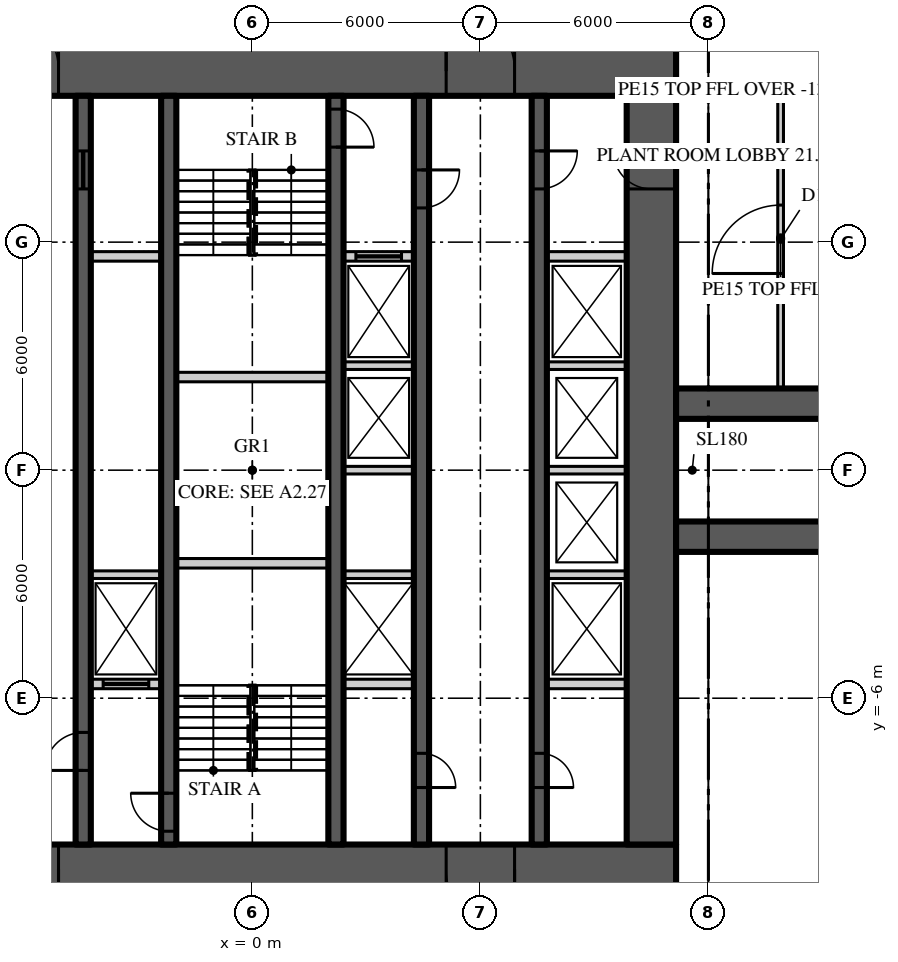
"""IFC4 building model, lengths in metres.
Left out: names, types, materials, properties, quantities, classifications, styles, units other than length and angle.
Written with IfcOpenShell. Run it as: python <this file> out.ifc"""

import sys

from ifc_helpers import new_model, si_unit, direction, frame, frame_2d, origin, place, context, subcontext, project, spatial, rectangle, extrude, element, fill, save


model = new_model("IFC4")
c1 = context("Model", 3, precision=1e-05, world=origin(), true_north=direction((0.0, 1.0)))
c2 = subcontext(c1, "Body", "Model", "MODEL_VIEW")
j1 = project(units=[si_unit("LENGTHUNIT", "METRE"), si_unit("PLANEANGLEUNIT", "RADIAN")], contexts=[c1])
p1 = place(None, origin())
s1 = spatial("IfcSite", under=j1, at=p1, CompositionType="ELEMENT")
p2 = place(p1, origin())
s2 = spatial("IfcBuilding", under=s1, at=p2, CompositionType="ELEMENT")
p3 = place(p2, frame((0.0, 0.0, 198.9)))
s3 = spatial("IfcBuildingStorey", under=s2, at=p3, CompositionType="ELEMENT", Elevation=198.9)
p4 = place(p3, frame((-11.15, 10.5, 0.0), z_axis=(0.0, 0.0, 1.0), x_axis=(1.0, 0.0, 0.0)))
e1 = element("IfcWall", 1, at=p4, inside=s3, PredefinedType="SHEAR", context=c2, shape_type="SweptSolid", body=[
    extrude(rectangle(XDim=22.3, YDim=1.3, at=frame_2d((11.15, 0.0))), origin(), (0.0, 0.0, 1.0), 6.0),
])
p5 = place(p4, frame((4.25, 0.0, 0.0)))
e2 = element("IfcOpeningElement", 2, at=p5, cuts=e1, PredefinedType="OPENING", context=c2, shape_type="SweptSolid", body=[
    extrude(rectangle(XDim=1.8, YDim=2.2, at=frame_2d((0.9, 1.1))), frame((0.0, 0.66, 0.0), z_axis=(0.0, -1.0, 0.0), x_axis=(1.0, 0.0, 0.0)), (0.0, 0.0, 1.0), 1.32),
])
p6 = place(p4, frame((16.25, 0.0, 0.0)))
e3 = element("IfcOpeningElement", 3, at=p6, cuts=e1, PredefinedType="OPENING", context=c2, shape_type="SweptSolid", body=[
    extrude(rectangle(XDim=1.8, YDim=2.2, at=frame_2d((0.9, 1.1))), frame((0.0, 0.66, 0.0), z_axis=(0.0, -1.0, 0.0), x_axis=(1.0, 0.0, 0.0)), (0.0, 0.0, 1.0), 1.32),
])
p7 = place(p3, frame((11.15, -10.5, 0.0), z_axis=(0.0, 0.0, 1.0), x_axis=(-1.0, 0.0, 0.0)))
e4 = element("IfcWall", 4, at=p7, inside=s3, PredefinedType="SHEAR", context=c2, shape_type="SweptSolid", body=[
    extrude(rectangle(XDim=22.3, YDim=1.3, at=frame_2d((11.15, 0.0))), origin(), (0.0, 0.0, 1.0), 6.0),
])
p8 = place(p7, frame((16.25, 0.0, 0.0)))
e5 = element("IfcOpeningElement", 5, at=p8, cuts=e4, PredefinedType="OPENING", context=c2, shape_type="SweptSolid", body=[
    extrude(rectangle(XDim=1.8, YDim=2.2, at=frame_2d((0.9, 1.1))), frame((0.0, 0.66, 0.0), z_axis=(0.0, -1.0, 0.0), x_axis=(1.0, 0.0, 0.0)), (0.0, 0.0, 1.0), 1.32),
])
p9 = place(p7, frame((4.25, 0.0, 0.0)))
e6 = element("IfcOpeningElement", 6, at=p9, cuts=e4, PredefinedType="OPENING", context=c2, shape_type="SweptSolid", body=[
    extrude(rectangle(XDim=1.8, YDim=2.2, at=frame_2d((0.9, 1.1))), frame((0.0, 0.66, 0.0), z_axis=(0.0, -1.0, 0.0), x_axis=(1.0, 0.0, 0.0)), (0.0, 0.0, 1.0), 1.32),
])
p10 = place(p3, frame((10.5, -9.85, 0.0), z_axis=(0.0, 0.0, 1.0), x_axis=(0.0, 1.0, 0.0)))
e7 = element("IfcWall", 7, at=p10, inside=s3, PredefinedType="SHEAR", context=c2, shape_type="SweptSolid", body=[
    extrude(rectangle(XDim=19.7, YDim=1.3, at=frame_2d((9.85, 0.0))), origin(), (0.0, 0.0, 1.0), 6.0),
])
p11 = place(p10, frame((17.25, 0.0, 0.0)))
e8 = element("IfcOpeningElement", 8, at=p11, cuts=e7, PredefinedType="OPENING", context=c2, shape_type="SweptSolid", body=[
    extrude(rectangle(XDim=1.0, YDim=2.2, at=frame_2d((0.5, 1.1))), frame((0.0, 0.66, 0.0), z_axis=(0.0, -1.0, 0.0), x_axis=(1.0, 0.0, 0.0)), (0.0, 0.0, 1.0), 1.32),
])
for number, where, z_axis, x_axis in (
    (9, (11.15, -1.75, 0.0), (0.0, 0.0, 1.0), (1.0, 0.0, 0.0)),
    (10, (11.15, 1.75, 0.0), (0.0, 0.0, 1.0), (1.0, 0.0, 0.0)),
):
    element("IfcWall", number, at=place(p3, frame(where, z_axis=z_axis, x_axis=x_axis)), inside=s3, PredefinedType="SHEAR", context=c2, shape_type="SweptSolid", body=[
        extrude(rectangle(XDim=15.25, YDim=0.8, at=frame_2d((7.625, 0.0))), origin(), (0.0, 0.0, 1.0), 6.0),
    ])
p12 = place(p3, frame((7.55, 9.85, 0.0), z_axis=(0.0, 0.0, 1.0), x_axis=(0.0, -1.0, 0.0)))
e11 = element("IfcWall", 11, at=p12, inside=s3, PredefinedType="SHEAR", context=c2, shape_type="SweptSolid", body=[
    extrude(rectangle(XDim=19.7, YDim=0.4, at=frame_2d((9.85, 0.0))), origin(), (0.0, 0.0, 1.0), 6.0),
])
p13 = place(p12, frame((1.45, 0.0, 0.0)))
e12 = element("IfcOpeningElement", 12, at=p13, cuts=e11, PredefinedType="OPENING", context=c2, shape_type="SweptSolid", body=[
    extrude(rectangle(XDim=1.0, YDim=2.2, at=frame_2d((0.5, 1.1))), frame((0.0, 0.21, 0.0), z_axis=(0.0, -1.0, 0.0), x_axis=(1.0, 0.0, 0.0)), (0.0, 0.0, 1.0), 0.42),
])
p14 = place(p12, frame((17.3, 0.0, 0.0)))
e13 = element("IfcOpeningElement", 13, at=p14, cuts=e11, PredefinedType="OPENING", context=c2, shape_type="SweptSolid", body=[
    extrude(rectangle(XDim=0.9, YDim=2.1, at=frame_2d((0.45, 1.05))), frame((0.0, 0.21, 0.0), z_axis=(0.0, -1.0, 0.0), x_axis=(1.0, 0.0, 0.0)), (0.0, 0.0, 1.0), 0.42),
])
p15 = place(p3, frame((-4.45, -9.85, 0.0), z_axis=(0.0, 0.0, 1.0), x_axis=(0.0, 1.0, 0.0)))
e14 = element("IfcWall", 14, at=p15, inside=s3, PredefinedType="SHEAR", context=c2, shape_type="SweptSolid", body=[
    extrude(rectangle(XDim=19.7, YDim=0.4, at=frame_2d((9.85, 0.0))), origin(), (0.0, 0.0, 1.0), 6.0),
])
p16 = place(p15, frame((1.95, 0.0, 0.0)))
e15 = element("IfcOpeningElement", 15, at=p16, cuts=e14, PredefinedType="OPENING", context=c2, shape_type="SweptSolid", body=[
    extrude(rectangle(XDim=1.0, YDim=2.2, at=frame_2d((0.5, 1.1))), frame((0.0, 0.21, 0.0), z_axis=(0.0, -1.0, 0.0), x_axis=(1.0, 0.0, 0.0)), (0.0, 0.0, 1.0), 0.42),
])
p17 = place(p15, frame((17.25, 0.0, 0.0)))
e16 = element("IfcOpeningElement", 16, at=p17, cuts=e14, PredefinedType="OPENING", context=c2, shape_type="SweptSolid", body=[
    extrude(rectangle(XDim=1.0, YDim=2.1, at=frame_2d((0.5, 1.05))), frame((0.0, 0.21, 0.0), z_axis=(0.0, -1.0, 0.0), x_axis=(1.0, 0.0, 0.0)), (0.0, 0.0, 1.0), 0.42),
])
p18 = place(p3, frame((4.45, 9.85, 0.0), z_axis=(0.0, 0.0, 1.0), x_axis=(0.0, -1.0, 0.0)))
e17 = element("IfcWall", 17, at=p18, inside=s3, PredefinedType="SHEAR", context=c2, shape_type="SweptSolid", body=[
    extrude(rectangle(XDim=19.7, YDim=0.4, at=frame_2d((9.85, 0.0))), origin(), (0.0, 0.0, 1.0), 6.0),
])
p19 = place(p18, frame((1.95, 0.0, 0.0)))
e18 = element("IfcOpeningElement", 18, at=p19, cuts=e17, PredefinedType="OPENING", context=c2, shape_type="SweptSolid", body=[
    extrude(rectangle(XDim=1.0, YDim=2.2, at=frame_2d((0.5, 1.1))), frame((0.0, 0.21, 0.0), z_axis=(0.0, -1.0, 0.0), x_axis=(1.0, 0.0, 0.0)), (0.0, 0.0, 1.0), 0.42),
])
p20 = place(p18, frame((17.3, 0.0, 0.0)))
e19 = element("IfcOpeningElement", 19, at=p20, cuts=e17, PredefinedType="OPENING", context=c2, shape_type="SweptSolid", body=[
    extrude(rectangle(XDim=0.9, YDim=2.1, at=frame_2d((0.45, 1.05))), frame((0.0, 0.21, 0.0), z_axis=(0.0, -1.0, 0.0), x_axis=(1.0, 0.0, 0.0)), (0.0, 0.0, 1.0), 0.42),
])
p21 = place(p3, frame((-2.2, -9.85, 0.0), z_axis=(0.0, 0.0, 1.0), x_axis=(0.0, 1.0, 0.0)))
e20 = element("IfcWall", 20, at=p21, inside=s3, PredefinedType="SHEAR", context=c2, shape_type="SweptSolid", body=[
    extrude(rectangle(XDim=19.7, YDim=0.4, at=frame_2d((9.85, 0.0))), origin(), (0.0, 0.0, 1.0), 6.0),
])
p22 = place(p21, frame((0.35, 0.0, 0.0)))
e21 = element("IfcOpeningElement", 21, at=p22, cuts=e20, PredefinedType="OPENING", context=c2, shape_type="SweptSolid", body=[
    extrude(rectangle(XDim=1.0, YDim=2.2, at=frame_2d((0.5, 1.1))), frame((0.0, 0.21, 0.0), z_axis=(0.0, -1.0, 0.0), x_axis=(1.0, 0.0, 0.0)), (0.0, 0.0, 1.0), 0.42),
])
p23 = place(p3, frame((2.2, 9.85, 0.0), z_axis=(0.0, 0.0, 1.0), x_axis=(0.0, -1.0, 0.0)))
e22 = element("IfcWall", 22, at=p23, inside=s3, PredefinedType="SHEAR", context=c2, shape_type="SweptSolid", body=[
    extrude(rectangle(XDim=19.7, YDim=0.4, at=frame_2d((9.85, 0.0))), origin(), (0.0, 0.0, 1.0), 6.0),
])
p24 = place(p23, frame((0.35, 0.0, 0.0)))
e23 = element("IfcOpeningElement", 23, at=p24, cuts=e22, PredefinedType="OPENING", context=c2, shape_type="SweptSolid", body=[
    extrude(rectangle(XDim=1.0, YDim=2.2, at=frame_2d((0.5, 1.1))), frame((0.0, 0.21, 0.0), z_axis=(0.0, -1.0, 0.0), x_axis=(1.0, 0.0, 0.0)), (0.0, 0.0, 1.0), 0.42),
])
p25 = place(p3, frame((-4.25, 5.625, 0.0), z_axis=(0.0, 0.0, 1.0), x_axis=(1.0, 0.0, 0.0)))
e24 = element("IfcWall", 24, at=p25, inside=s3, PredefinedType="SOLIDWALL", context=c2, shape_type="SweptSolid", body=[
    extrude(rectangle(XDim=1.85, YDim=0.25, at=frame_2d((0.925, 0.0))), origin(), (0.0, 0.0, 1.0), 5.8),
])
p26 = place(p3, frame((2.4, 5.625, 0.0), z_axis=(0.0, 0.0, 1.0), x_axis=(1.0, 0.0, 0.0)))
e25 = element("IfcWall", 25, at=p26, inside=s3, PredefinedType="SOLIDWALL", context=c2, shape_type="SweptSolid", body=[
    extrude(rectangle(XDim=1.85, YDim=0.25, at=frame_2d((0.925, 0.0))), origin(), (0.0, 0.0, 1.0), 5.8),
])
p27 = place(p26, frame((0.325, 0.0, 0.0)))
e26 = element("IfcOpeningElement", 26, at=p27, cuts=e25, PredefinedType="OPENING", context=c2, shape_type="SweptSolid", body=[
    extrude(rectangle(XDim=1.2, YDim=2.2, at=frame_2d((0.6, 1.1))), frame((0.0, 0.135, 0.0), z_axis=(0.0, -1.0, 0.0), x_axis=(1.0, 0.0, 0.0)), (0.0, 0.0, 1.0), 0.27),
])
p28 = place(p3, frame((7.75, 5.625, 0.0), z_axis=(0.0, 0.0, 1.0), x_axis=(1.0, 0.0, 0.0)))
e27 = element("IfcWall", 27, at=p28, inside=s3, PredefinedType="SOLIDWALL", context=c2, shape_type="SweptSolid", body=[
    extrude(rectangle(XDim=2.1, YDim=0.25, at=frame_2d((1.05, 0.0))), origin(), (0.0, 0.0, 1.0), 5.8),
])
p29 = place(p3, frame((-4.25, -5.625, 0.0), z_axis=(0.0, 0.0, 1.0), x_axis=(1.0, 0.0, 0.0)))
e28 = element("IfcWall", 28, at=p29, inside=s3, PredefinedType="SOLIDWALL", context=c2, shape_type="SweptSolid", body=[
    extrude(rectangle(XDim=1.85, YDim=0.25, at=frame_2d((0.925, 0.0))), origin(), (0.0, 0.0, 1.0), 5.8),
])
p30 = place(p29, frame((0.325, 0.0, 0.0)))
e29 = element("IfcOpeningElement", 29, at=p30, cuts=e28, PredefinedType="OPENING", context=c2, shape_type="SweptSolid", body=[
    extrude(rectangle(XDim=1.2, YDim=2.2, at=frame_2d((0.6, 1.1))), frame((0.0, 0.135, 0.0), z_axis=(0.0, -1.0, 0.0), x_axis=(1.0, 0.0, 0.0)), (0.0, 0.0, 1.0), 0.27),
])
p31 = place(p3, frame((2.4, -5.625, 0.0), z_axis=(0.0, 0.0, 1.0), x_axis=(1.0, 0.0, 0.0)))
e30 = element("IfcWall", 30, at=p31, inside=s3, PredefinedType="SOLIDWALL", context=c2, shape_type="SweptSolid", body=[
    extrude(rectangle(XDim=1.85, YDim=0.25, at=frame_2d((0.925, 0.0))), origin(), (0.0, 0.0, 1.0), 5.8),
])
p32 = place(p3, frame((7.75, -5.625, 0.0), z_axis=(0.0, 0.0, 1.0), x_axis=(1.0, 0.0, 0.0)))
e31 = element("IfcWall", 31, at=p32, inside=s3, PredefinedType="SOLIDWALL", context=c2, shape_type="SweptSolid", body=[
    extrude(rectangle(XDim=2.1, YDim=0.25, at=frame_2d((1.05, 0.0))), origin(), (0.0, 0.0, 1.0), 5.8),
])
for number, where, z_axis, x_axis in (
    (32, (-2.0, -2.45, 0.0), (0.0, 0.0, 1.0), (1.0, 0.0, 0.0)),
    (33, (-2.0, 2.45, 0.0), (0.0, 0.0, 1.0), (1.0, 0.0, 0.0)),
):
    element("IfcWall", number, at=place(p3, frame(where, z_axis=z_axis, x_axis=x_axis)), inside=s3, PredefinedType="SOLIDWALL", context=c2, shape_type="SweptSolid", body=[
        extrude(rectangle(XDim=4.0, YDim=0.25, at=frame_2d((2.0, 0.0))), origin(), (0.0, 0.0, 1.0), 5.8),
    ])
for number, where, z_axis, x_axis in (
    (34, (-4.25, -2.75, 0.0), (0.0, 0.0, 1.0), (1.0, 0.0, 0.0)),
    (35, (2.4, -2.75, 0.0), (0.0, 0.0, 1.0), (1.0, 0.0, 0.0)),
):
    element("IfcWall", number, at=place(p3, frame(where, z_axis=z_axis, x_axis=x_axis)), inside=s3, PredefinedType="SOLIDWALL", context=c2, shape_type="SweptSolid", body=[
        extrude(rectangle(XDim=1.85, YDim=0.2, at=frame_2d((0.925, 0.0))), origin(), (0.0, 0.0, 1.0), 5.8),
    ])
p33 = place(p3, frame((7.75, -2.75, 0.0), z_axis=(0.0, 0.0, 1.0), x_axis=(1.0, 0.0, 0.0)))
e36 = element("IfcWall", 36, at=p33, inside=s3, PredefinedType="SOLIDWALL", context=c2, shape_type="SweptSolid", body=[
    extrude(rectangle(XDim=2.1, YDim=0.2, at=frame_2d((1.05, 0.0))), origin(), (0.0, 0.0, 1.0), 5.8),
])
p34 = place(p3, frame((2.4, 0.0, 0.0), z_axis=(0.0, 0.0, 1.0), x_axis=(1.0, 0.0, 0.0)))
e37 = element("IfcWall", 37, at=p34, inside=s3, PredefinedType="SOLIDWALL", context=c2, shape_type="SweptSolid", body=[
    extrude(rectangle(XDim=1.85, YDim=0.2, at=frame_2d((0.925, 0.0))), origin(), (0.0, 0.0, 1.0), 5.8),
])
p35 = place(p3, frame((7.75, 0.0, 0.0), z_axis=(0.0, 0.0, 1.0), x_axis=(1.0, 0.0, 0.0)))
e38 = element("IfcWall", 38, at=p35, inside=s3, PredefinedType="SOLIDWALL", context=c2, shape_type="SweptSolid", body=[
    extrude(rectangle(XDim=2.1, YDim=0.2, at=frame_2d((1.05, 0.0))), origin(), (0.0, 0.0, 1.0), 5.8),
])
p36 = place(p3, frame((2.4, 2.75, 0.0), z_axis=(0.0, 0.0, 1.0), x_axis=(1.0, 0.0, 0.0)))
e39 = element("IfcWall", 39, at=p36, inside=s3, PredefinedType="SOLIDWALL", context=c2, shape_type="SweptSolid", body=[
    extrude(rectangle(XDim=1.85, YDim=0.2, at=frame_2d((0.925, 0.0))), origin(), (0.0, 0.0, 1.0), 5.8),
])
p37 = place(p3, frame((7.75, 2.75, 0.0), z_axis=(0.0, 0.0, 1.0), x_axis=(1.0, 0.0, 0.0)))
e40 = element("IfcWall", 40, at=p37, inside=s3, PredefinedType="SOLIDWALL", context=c2, shape_type="SweptSolid", body=[
    extrude(rectangle(XDim=2.1, YDim=0.2, at=frame_2d((1.05, 0.0))), origin(), (0.0, 0.0, 1.0), 5.8),
])
p38 = place(p3, frame((13.9, 2.15, 0.0), z_axis=(0.0, 0.0, 1.0), x_axis=(0.0, 1.0, 0.0)))
e41 = element("IfcWall", 41, at=p38, inside=s3, PredefinedType="SOLIDWALL", context=c2, shape_type="SweptSolid", body=[
    extrude(rectangle(XDim=7.925, YDim=0.15, at=frame_2d((3.962, 0.0))), origin(), (0.0, 0.0, 1.0), 5.18),
])
p39 = place(p38, frame((3.025, 0.0, 0.0)))
e42 = element("IfcOpeningElement", 42, at=p39, cuts=e41, PredefinedType="OPENING", context=c2, shape_type="SweptSolid", body=[
    extrude(rectangle(XDim=1.8, YDim=2.4, at=frame_2d((0.9, 1.2))), frame((0.0, 0.085, 0.0), z_axis=(0.0, -1.0, 0.0), x_axis=(1.0, 0.0, 0.0)), (0.0, 0.0, 1.0), 0.17),
])
p40 = place(p3, frame((11.15, 10.0, 0.0), z_axis=(0.0, 0.0, 1.0), x_axis=(1.0, 0.0, 0.0)))
e43 = element("IfcWall", 43, at=p40, inside=s3, PredefinedType="SOLIDWALL", context=c2, shape_type="SweptSolid", body=[
    extrude(rectangle(XDim=2.675, YDim=0.15, at=frame_2d((1.337, 0.0))), origin(), (0.0, 0.0, 1.0), 5.87),
])
p41 = place(p5, origin())
e44 = element("IfcDoor", 44, at=p41, inside=s3, OperationType="DOUBLE_DOOR_DOUBLE_SWING", PredefinedType="DOOR", context=c2, shape_type="SweptSolid", body=[
    extrude(rectangle(XDim=1.8, YDim=2.2, at=frame_2d((0.9, 1.1))), frame((0.0, 0.025, 0.0), z_axis=(0.0, -1.0, 0.0), x_axis=(1.0, 0.0, 0.0)), (0.0, 0.0, 1.0), 0.05),
])
fill(e2, e44)
p42 = place(p8, origin())
e45 = element("IfcDoor", 45, at=p42, inside=s3, OperationType="DOUBLE_DOOR_DOUBLE_SWING", PredefinedType="DOOR", context=c2, shape_type="SweptSolid", body=[
    extrude(rectangle(XDim=1.8, YDim=2.2, at=frame_2d((0.9, 1.1))), frame((0.0, 0.025, 0.0), z_axis=(0.0, -1.0, 0.0), x_axis=(1.0, 0.0, 0.0)), (0.0, 0.0, 1.0), 0.05),
])
fill(e5, e45)
p43 = place(p6, origin())
e46 = element("IfcDoor", 46, at=p43, inside=s3, OperationType="DOUBLE_DOOR_DOUBLE_SWING", PredefinedType="DOOR", context=c2, shape_type="SweptSolid", body=[
    extrude(rectangle(XDim=1.8, YDim=2.2, at=frame_2d((0.9, 1.1))), frame((0.0, 0.025, 0.0), z_axis=(0.0, -1.0, 0.0), x_axis=(1.0, 0.0, 0.0)), (0.0, 0.0, 1.0), 0.05),
])
fill(e3, e46)
p44 = place(p9, origin())
e47 = element("IfcDoor", 47, at=p44, inside=s3, OperationType="DOUBLE_DOOR_DOUBLE_SWING", PredefinedType="DOOR", context=c2, shape_type="SweptSolid", body=[
    extrude(rectangle(XDim=1.8, YDim=2.2, at=frame_2d((0.9, 1.1))), frame((0.0, 0.025, 0.0), z_axis=(0.0, -1.0, 0.0), x_axis=(1.0, 0.0, 0.0)), (0.0, 0.0, 1.0), 0.05),
])
fill(e6, e47)
p45 = place(p13, origin())
e48 = element("IfcDoor", 48, at=p45, inside=s3, OperationType="SINGLE_SWING_LEFT", PredefinedType="DOOR", context=c2, shape_type="SweptSolid", body=[
    extrude(rectangle(XDim=1.0, YDim=2.2, at=frame_2d((0.5, 1.1))), frame((0.0, 0.025, 0.0), z_axis=(0.0, -1.0, 0.0), x_axis=(1.0, 0.0, 0.0)), (0.0, 0.0, 1.0), 0.05),
])
fill(e12, e48)
p46 = place(p11, origin())
e49 = element("IfcDoor", 49, at=p46, inside=s3, OperationType="SINGLE_SWING_RIGHT", PredefinedType="DOOR", context=c2, shape_type="SweptSolid", body=[
    extrude(rectangle(XDim=1.0, YDim=2.2, at=frame_2d((0.5, 1.1))), frame((0.0, 0.025, 0.0), z_axis=(0.0, -1.0, 0.0), x_axis=(1.0, 0.0, 0.0)), (0.0, 0.0, 1.0), 0.05),
])
fill(e8, e49)
p47 = place(p16, origin())
e50 = element("IfcDoor", 50, at=p47, inside=s3, OperationType="SINGLE_SWING_LEFT", PredefinedType="DOOR", context=c2, shape_type="SweptSolid", body=[
    extrude(rectangle(XDim=1.0, YDim=2.2, at=frame_2d((0.5, 1.1))), frame((0.0, 0.025, 0.0), z_axis=(0.0, -1.0, 0.0), x_axis=(1.0, 0.0, 0.0)), (0.0, 0.0, 1.0), 0.05),
])
fill(e15, e50)
p48 = place(p22, origin())
e51 = element("IfcDoor", 51, at=p48, inside=s3, OperationType="SINGLE_SWING_RIGHT", PredefinedType="DOOR", context=c2, shape_type="SweptSolid", body=[
    extrude(rectangle(XDim=1.0, YDim=2.2, at=frame_2d((0.5, 1.1))), frame((0.0, 0.025, 0.0), z_axis=(0.0, -1.0, 0.0), x_axis=(1.0, 0.0, 0.0)), (0.0, 0.0, 1.0), 0.05),
])
fill(e21, e51)
p49 = place(p19, origin())
e52 = element("IfcDoor", 52, at=p49, inside=s3, OperationType="SINGLE_SWING_LEFT", PredefinedType="DOOR", context=c2, shape_type="SweptSolid", body=[
    extrude(rectangle(XDim=1.0, YDim=2.2, at=frame_2d((0.5, 1.1))), frame((0.0, 0.025, 0.0), z_axis=(0.0, -1.0, 0.0), x_axis=(1.0, 0.0, 0.0)), (0.0, 0.0, 1.0), 0.05),
])
fill(e18, e52)
p50 = place(p24, origin())
e53 = element("IfcDoor", 53, at=p50, inside=s3, OperationType="SINGLE_SWING_RIGHT", PredefinedType="DOOR", context=c2, shape_type="SweptSolid", body=[
    extrude(rectangle(XDim=1.0, YDim=2.2, at=frame_2d((0.5, 1.1))), frame((0.0, 0.025, 0.0), z_axis=(0.0, -1.0, 0.0), x_axis=(1.0, 0.0, 0.0)), (0.0, 0.0, 1.0), 0.05),
])
fill(e23, e53)
p51 = place(p17, origin())
e54 = element("IfcDoor", 54, at=p51, inside=s3, OperationType="SLIDING_TO_LEFT", PredefinedType="DOOR", context=c2, shape_type="SweptSolid", body=[
    extrude(rectangle(XDim=1.0, YDim=2.1, at=frame_2d((0.5, 1.05))), frame((0.0, 0.025, 0.0), z_axis=(0.0, -1.0, 0.0), x_axis=(1.0, 0.0, 0.0)), (0.0, 0.0, 1.0), 0.05),
])
fill(e16, e54)
p52 = place(p14, origin())
e55 = element("IfcDoor", 55, at=p52, inside=s3, OperationType="SINGLE_SWING_RIGHT", PredefinedType="DOOR", context=c2, shape_type="SweptSolid", body=[
    extrude(rectangle(XDim=0.9, YDim=2.1, at=frame_2d((0.45, 1.05))), frame((0.0, 0.025, 0.0), z_axis=(0.0, -1.0, 0.0), x_axis=(1.0, 0.0, 0.0)), (0.0, 0.0, 1.0), 0.05),
])
fill(e13, e55)
p53 = place(p20, origin())
e56 = element("IfcDoor", 56, at=p53, inside=s3, OperationType="SINGLE_SWING_RIGHT", PredefinedType="DOOR", context=c2, shape_type="SweptSolid", body=[
    extrude(rectangle(XDim=0.9, YDim=2.1, at=frame_2d((0.45, 1.05))), frame((0.0, 0.025, 0.0), z_axis=(0.0, -1.0, 0.0), x_axis=(1.0, 0.0, 0.0)), (0.0, 0.0, 1.0), 0.05),
])
fill(e19, e56)
p54 = place(p30, origin())
e57 = element("IfcDoor", 57, at=p54, inside=s3, OperationType="SLIDING_TO_LEFT", PredefinedType="DOOR", context=c2, shape_type="SweptSolid", body=[
    extrude(rectangle(XDim=1.2, YDim=2.2, at=frame_2d((0.6, 1.1))), frame((0.0, 0.025, 0.0), z_axis=(0.0, -1.0, 0.0), x_axis=(1.0, 0.0, 0.0)), (0.0, 0.0, 1.0), 0.05),
])
fill(e29, e57)
p55 = place(p27, origin())
e58 = element("IfcDoor", 58, at=p55, inside=s3, OperationType="SLIDING_TO_LEFT", PredefinedType="DOOR", context=c2, shape_type="SweptSolid", body=[
    extrude(rectangle(XDim=1.2, YDim=2.2, at=frame_2d((0.6, 1.1))), frame((0.0, 0.025, 0.0), z_axis=(0.0, -1.0, 0.0), x_axis=(1.0, 0.0, 0.0)), (0.0, 0.0, 1.0), 0.05),
])
fill(e26, e58)
p56 = place(p39, origin())
e59 = element("IfcDoor", 59, at=p56, inside=s3, OperationType="DOUBLE_DOOR_DOUBLE_SWING", PredefinedType="DOOR", context=c2, shape_type="SweptSolid", body=[
    extrude(rectangle(XDim=1.8, YDim=2.4, at=frame_2d((0.9, 1.2))), frame((0.0, 0.025, 0.0), z_axis=(0.0, -1.0, 0.0), x_axis=(1.0, 0.0, 0.0)), (0.0, 0.0, 1.0), 0.05),
])
fill(e42, e59)
save(model, sys.argv[1])
